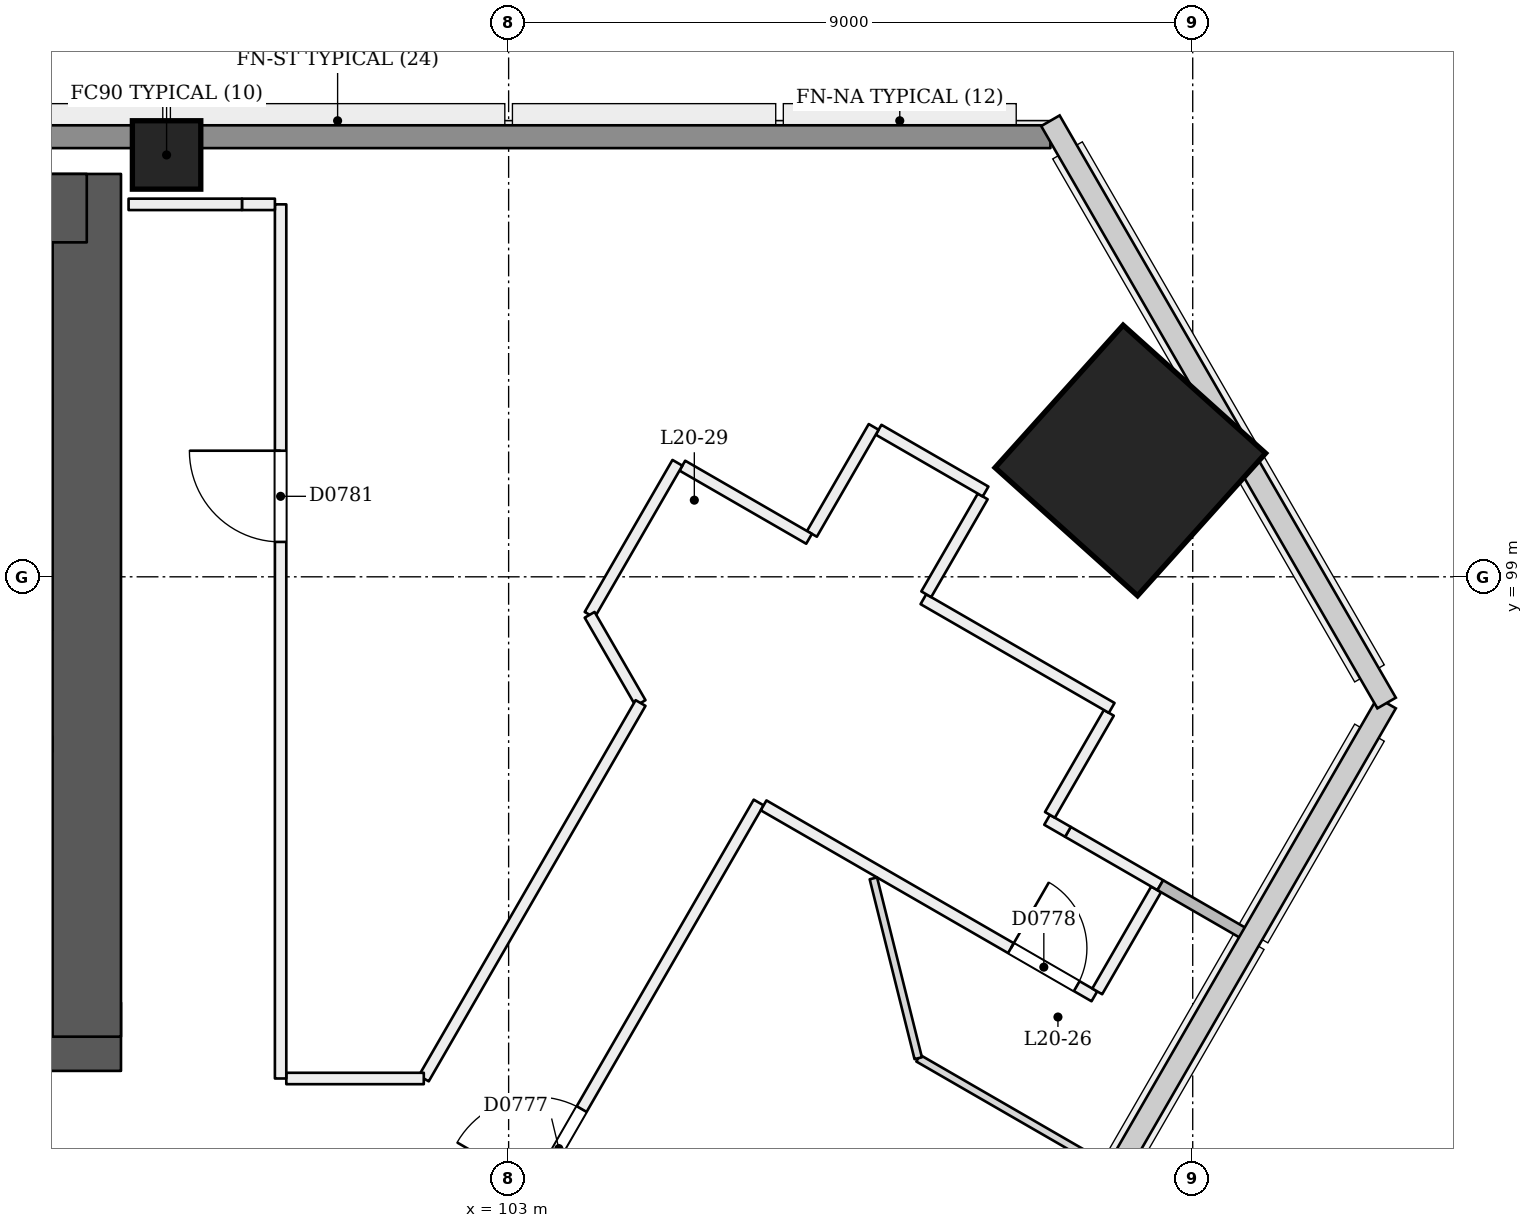
"""IFC4 building model, lengths in metres.
Left out: names, types, materials, properties, quantities, classifications, styles, units other than length and angle.
Written with IfcOpenShell. Run it as: python <this file> out.ifc"""

import sys

from ifc_helpers import new_model, si_unit, direction, frame, frame_2d, origin, origin_2d, place, context, subcontext, project, spatial, rectangle, extrude, element, fill, save


model = new_model("IFC4")
c1 = context("Model", 3, precision=1e-05, world=origin(), true_north=direction((0.0, 1.0)))
c2 = subcontext(c1, "Body", "Model", "MODEL_VIEW")
j1 = project(units=[si_unit("LENGTHUNIT", "METRE"), si_unit("PLANEANGLEUNIT", "RADIAN")], contexts=[c1])
p1 = place(None, origin())
s1 = spatial("IfcSite", under=j1, at=p1, CompositionType="ELEMENT")
p2 = place(p1, origin())
s2 = spatial("IfcBuilding", under=s1, at=p2, CompositionType="ELEMENT")
p3 = place(p2, frame((0.0, 0.0, 81.0)))
s3 = spatial("IfcBuildingStorey", under=s2, at=p3, CompositionType="ELEMENT", Elevation=81.0)
p4 = place(p3, frame((72.55, 92.95, 0.0), z_axis=(0.0, 0.0, 1.0), x_axis=(1.0, 0.0, 0.0)))
e1 = element("IfcWall", 1, at=p4, inside=s3, PredefinedType="SHEAR", context=c2, shape_type="SweptSolid", body=[
    extrude(rectangle(XDim=25.35, YDim=0.9, at=frame_2d((12.675, 0.0))), origin(), (0.0, 0.0, 1.0), 3.6),
])
p5 = place(p4, frame((1.25, 0.0, 0.0)))
e2 = element("IfcOpeningElement", 2, at=p5, cuts=e1, PredefinedType="OPENING", context=c2, shape_type="SweptSolid", body=[
    extrude(rectangle(XDim=1.2, YDim=2.1, at=frame_2d((0.6, 1.05))), frame((0.0, 0.46, 0.0), z_axis=(0.0, -1.0, 0.0), x_axis=(1.0, 0.0, 0.0)), (0.0, 0.0, 1.0), 0.921),
])
p6 = place(p4, frame((3.45, 0.0, 0.0)))
e3 = element("IfcOpeningElement", 3, at=p6, cuts=e1, PredefinedType="OPENING", context=c2, shape_type="SweptSolid", body=[
    extrude(rectangle(XDim=1.2, YDim=2.1, at=frame_2d((0.6, 1.05))), frame((0.0, 0.46, 0.0), z_axis=(0.0, -1.0, 0.0), x_axis=(1.0, 0.0, 0.0)), (0.0, 0.0, 1.0), 0.921),
])
p7 = place(p4, frame((13.45, 0.0, 0.0)))
e4 = element("IfcOpeningElement", 4, at=p7, cuts=e1, PredefinedType="OPENING", context=c2, shape_type="SweptSolid", body=[
    extrude(rectangle(XDim=1.2, YDim=2.1, at=frame_2d((0.6, 1.05))), frame((0.0, 0.46, 0.0), z_axis=(0.0, -1.0, 0.0), x_axis=(1.0, 0.0, 0.0)), (0.0, 0.0, 1.0), 0.921),
])
p8 = place(p4, frame((15.913, 0.0, 0.0)))
e5 = element("IfcOpeningElement", 5, at=p8, cuts=e1, PredefinedType="OPENING", context=c2, shape_type="SweptSolid", body=[
    extrude(rectangle(XDim=1.0, YDim=2.1, at=frame_2d((0.5, 1.05))), frame((0.0, 0.46, 0.0), z_axis=(0.0, -1.0, 0.0), x_axis=(1.0, 0.0, 0.0)), (0.0, 0.0, 1.0), 0.921),
])
p9 = place(p4, frame((18.35, 0.0, 0.0)))
e6 = element("IfcOpeningElement", 6, at=p9, cuts=e1, PredefinedType="OPENING", context=c2, shape_type="SweptSolid", body=[
    extrude(rectangle(XDim=1.0, YDim=2.1, at=frame_2d((0.5, 1.05))), frame((0.0, 0.46, 0.0), z_axis=(0.0, -1.0, 0.0), x_axis=(1.0, 0.0, 0.0)), (0.0, 0.0, 1.0), 0.921),
])
p10 = place(p4, frame((20.7, 0.0, 0.0)))
e7 = element("IfcOpeningElement", 7, at=p10, cuts=e1, PredefinedType="OPENING", context=c2, shape_type="SweptSolid", body=[
    extrude(rectangle(XDim=1.0, YDim=2.1, at=frame_2d((0.5, 1.05))), frame((0.0, 0.46, 0.0), z_axis=(0.0, -1.0, 0.0), x_axis=(1.0, 0.0, 0.0)), (0.0, 0.0, 1.0), 0.921),
])
p11 = place(p4, frame((22.988, 0.0, 0.0)))
e8 = element("IfcOpeningElement", 8, at=p11, cuts=e1, PredefinedType="OPENING", context=c2, shape_type="SweptSolid", body=[
    extrude(rectangle(XDim=1.0, YDim=2.1, at=frame_2d((0.5, 1.05))), frame((0.0, 0.46, 0.0), z_axis=(0.0, -1.0, 0.0), x_axis=(1.0, 0.0, 0.0)), (0.0, 0.0, 1.0), 0.921),
])
p12 = place(p3, frame((97.45, 92.95, 0.0), z_axis=(0.0, 0.0, 1.0), x_axis=(0.0, 1.0, 0.0)))
e9 = element("IfcWall", 9, at=p12, inside=s3, PredefinedType="SHEAR", context=c2, shape_type="SweptSolid", body=[
    extrude(rectangle(XDim=11.35, YDim=0.9, at=frame_2d((5.675, 0.0))), origin(), (0.0, 0.0, 1.0), 3.6),
])
p13 = place(p3, frame((97.45, 103.85, 0.0), z_axis=(0.0, 0.0, 1.0), x_axis=(-1.0, 0.0, 0.0)))
e10 = element("IfcWall", 10, at=p13, inside=s3, PredefinedType="SHEAR", context=c2, shape_type="SweptSolid", body=[
    extrude(rectangle(XDim=25.35, YDim=0.9, at=frame_2d((12.675, 0.0))), origin(), (0.0, 0.0, 1.0), 3.6),
])
p14 = place(p3, frame((111.213, 100.52, 0.0), z_axis=(-0.028334066552, 0.009286524205, 0.999555371723), x_axis=(0.498275404519, -0.866735139792, 0.022176985843)))
e11 = element("IfcColumn", 11, at=p14, inside=s3, PredefinedType="COLUMN", context=c2, shape_type="SweptSolid", body=[
    extrude(rectangle(XDim=2.52, YDim=2.52, at=origin_2d()), origin(), (0.0, 0.0, 1.0), 3.602),
])
p15 = place(p3, frame((98.5, 104.55, 0.0), z_axis=(0.0, 0.0, 1.0), x_axis=(1.0, 0.0, 0.0)))
e12 = element("IfcColumn", 12, at=p15, inside=s3, PredefinedType="COLUMN", context=c2, shape_type="SweptSolid", body=[
    extrude(rectangle(XDim=0.9, YDim=0.9, at=origin_2d()), origin(), (0.0, 0.0, 1.0), 3.6),
])
p16 = place(p3, frame((85.67, 60.317, 0.0), z_axis=(0.0, 0.0, 1.0), x_axis=(0.499998839017, 0.866026074077, 0.0)))
e13 = element("IfcWall", 13, at=p16, inside=s3, PredefinedType="PARTITIONING", context=c2, shape_type="SweptSolid", body=[
    extrude(rectangle(XDim=41.239, YDim=0.15, at=frame_2d((20.62, 0.0))), origin(), (0.0, 0.0, 1.0), 2.7),
])
p17 = place(p16, frame((3.246, 0.0, 0.0)))
e14 = element("IfcOpeningElement", 14, at=p17, cuts=e13, PredefinedType="OPENING", context=c2, shape_type="SweptSolid", body=[
    extrude(rectangle(XDim=1.2, YDim=2.1, at=frame_2d((0.6, 1.05))), frame((0.0, 0.085, 0.0), z_axis=(0.0, -1.0, 0.0), x_axis=(1.0, 0.0, 0.0)), (0.0, 0.0, 1.0), 0.171),
])
p18 = place(p16, frame((10.771, 0.0, 0.0)))
e15 = element("IfcOpeningElement", 15, at=p18, cuts=e13, PredefinedType="OPENING", context=c2, shape_type="SweptSolid", body=[
    extrude(rectangle(XDim=1.0, YDim=2.1, at=frame_2d((0.5, 1.05))), frame((0.0, 0.085, 0.0), z_axis=(0.0, -1.0, 0.0), x_axis=(1.0, 0.0, 0.0)), (0.0, 0.0, 1.0), 0.171),
])
p19 = place(p16, frame((14.125, 0.0, 0.0)))
e16 = element("IfcOpeningElement", 16, at=p19, cuts=e13, PredefinedType="OPENING", context=c2, shape_type="SweptSolid", body=[
    extrude(rectangle(XDim=1.0, YDim=2.1, at=frame_2d((0.5, 1.05))), frame((0.0, 0.085, 0.0), z_axis=(0.0, -1.0, 0.0), x_axis=(1.0, 0.0, 0.0)), (0.0, 0.0, 1.0), 0.171),
])
p20 = place(p16, frame((19.771, 0.0, 0.0)))
e17 = element("IfcOpeningElement", 17, at=p20, cuts=e13, PredefinedType="OPENING", context=c2, shape_type="SweptSolid", body=[
    extrude(rectangle(XDim=1.0, YDim=2.1, at=frame_2d((0.5, 1.05))), frame((0.0, 0.085, 0.0), z_axis=(0.0, -1.0, 0.0), x_axis=(1.0, 0.0, 0.0)), (0.0, 0.0, 1.0), 0.171),
])
p21 = place(p16, frame((21.98, 0.0, 0.0)))
e18 = element("IfcOpeningElement", 18, at=p21, cuts=e13, PredefinedType="OPENING", context=c2, shape_type="SweptSolid", body=[
    extrude(rectangle(XDim=1.0, YDim=2.1, at=frame_2d((0.5, 1.05))), frame((0.0, 0.085, 0.0), z_axis=(0.0, -1.0, 0.0), x_axis=(1.0, 0.0, 0.0)), (0.0, 0.0, 1.0), 0.171),
])
p22 = place(p16, frame((28.655, 0.0, 0.0)))
e19 = element("IfcOpeningElement", 19, at=p22, cuts=e13, PredefinedType="OPENING", context=c2, shape_type="SweptSolid", body=[
    extrude(rectangle(XDim=1.0, YDim=2.1, at=frame_2d((0.5, 1.05))), frame((0.0, 0.085, 0.0), z_axis=(0.0, -1.0, 0.0), x_axis=(1.0, 0.0, 0.0)), (0.0, 0.0, 1.0), 0.171),
])
p23 = place(p16, frame((35.382, 0.0, 0.0)))
e20 = element("IfcOpeningElement", 20, at=p23, cuts=e13, PredefinedType="OPENING", context=c2, shape_type="SweptSolid", body=[
    extrude(rectangle(XDim=1.2, YDim=2.1, at=frame_2d((0.6, 1.05))), frame((0.0, 0.085, 0.0), z_axis=(0.0, -1.0, 0.0), x_axis=(1.0, 0.0, 0.0)), (0.0, 0.0, 1.0), 0.171),
])
p24 = place(p3, frame((106.354, 95.993, 0.0), z_axis=(0.0, 0.0, 1.0), x_axis=(0.86603105345, -0.499990214365, 0.0)))
e21 = element("IfcWall", 21, at=p24, inside=s3, PredefinedType="PARTITIONING", context=c2, shape_type="SweptSolid", body=[
    extrude(rectangle(XDim=5.025, YDim=0.15, at=frame_2d((2.512, 0.0))), origin(), (0.0, 0.0, 1.0), 2.6),
])
p25 = place(p24, frame((3.757, 0.0, 0.0)))
e22 = element("IfcOpeningElement", 22, at=p25, cuts=e21, PredefinedType="OPENING", context=c2, shape_type="SweptSolid", body=[
    extrude(rectangle(XDim=1.0, YDim=2.1, at=frame_2d((0.5, 1.05))), frame((0.0, 0.085, 0.0), z_axis=(0.0, -1.0, 0.0), x_axis=(1.0, 0.0, 0.0)), (0.0, 0.0, 1.0), 0.171),
])
p26 = place(p3, frame((110.744, 93.546, 0.0), z_axis=(0.0, 0.0, 1.0), x_axis=(0.500086022567, 0.865975732936, 0.0)))
e23 = element("IfcWall", 23, at=p26, inside=s3, PredefinedType="PARTITIONING", context=c2, shape_type="SweptSolid", body=[
    extrude(rectangle(XDim=1.55, YDim=0.15, at=frame_2d((0.775, 0.0))), origin(), (0.0, 0.0, 1.0), 3.1),
])
p27 = place(p3, frame((111.573, 94.943, 0.0), z_axis=(0.0, 0.0, 1.0), x_axis=(-0.865985641702, 0.500068863623, 0.0)))
e24 = element("IfcWall", 24, at=p27, inside=s3, PredefinedType="PARTITIONING", context=c2, shape_type="SweptSolid", body=[
    extrude(rectangle(XDim=1.403, YDim=0.15, at=frame_2d((0.702, 0.0))), origin(), (0.0, 0.0, 1.0), 3.1),
])
p28 = place(p3, frame((110.358, 95.645, 0.0), z_axis=(0.0, 0.0, 1.0), x_axis=(-0.8660059538, 0.500033686847, 0.0)))
e25 = element("IfcWall", 25, at=p28, inside=s3, PredefinedType="PARTITIONING", context=c2, shape_type="SweptSolid", body=[
    extrude(rectangle(XDim=0.317, YDim=0.15, at=frame_2d((0.158, 0.0))), origin(), (0.0, 0.0, 1.0), 2.6),
])
p29 = place(p3, frame((110.122, 95.868, 0.0), z_axis=(0.0, 0.0, 1.0), x_axis=(0.499967891604, 0.866043940782, 0.0)))
e26 = element("IfcWall", 26, at=p29, inside=s3, PredefinedType="PARTITIONING", context=c2, shape_type="SweptSolid", body=[
    extrude(rectangle(XDim=1.55, YDim=0.15, at=frame_2d((0.775, 0.0))), origin(), (0.0, 0.0, 1.0), 2.6),
])
p30 = place(p3, frame((110.934, 97.275, 0.0), z_axis=(0.0, 0.0, 1.0), x_axis=(-0.866039195244, 0.499976111731, 0.0)))
e27 = element("IfcWall", 27, at=p30, inside=s3, PredefinedType="PARTITIONING", context=c2, shape_type="SweptSolid", body=[
    extrude(rectangle(XDim=2.861, YDim=0.15, at=frame_2d((1.43, 0.0))), origin(), (0.0, 0.0, 1.0), 2.6),
])
p31 = place(p3, frame((108.494, 98.771, 0.0), z_axis=(0.0, 0.0, 1.0), x_axis=(0.499973719246, 0.866040576453, 0.0)))
e28 = element("IfcWall", 28, at=p31, inside=s3, PredefinedType="PARTITIONING", context=c2, shape_type="SweptSolid", body=[
    extrude(rectangle(XDim=1.486, YDim=0.15, at=frame_2d((0.743, 0.0))), origin(), (0.0, 0.0, 1.0), 3.1),
])
for number, where, z_axis, x_axis in (
    (29, (109.275, 100.122, 0.0), (0.0, 0.0, 1.0), (-0.866, 0.5, 0.0)),
    (30, (107.802, 100.972, 0.0), (0.0, 0.0, 1.0), (-0.5, -0.866, 0.0)),
):
    element("IfcWall", number, at=place(p3, frame(where, z_axis=z_axis, x_axis=x_axis)), inside=s3, PredefinedType="PARTITIONING", context=c2, shape_type="SweptSolid", body=[
        extrude(rectangle(XDim=1.625, YDim=0.15, at=frame_2d((0.812, 0.0))), origin(), (0.0, 0.0, 1.0), 3.1),
    ])
p32 = place(p3, frame((106.952, 99.5, 0.0), z_axis=(0.0, 0.0, 1.0), x_axis=(-0.866033512162, 0.499985955615, 0.0)))
e31 = element("IfcWall", 31, at=p32, inside=s3, PredefinedType="PARTITIONING", context=c2, shape_type="SweptSolid", body=[
    extrude(rectangle(XDim=1.925, YDim=0.15, at=frame_2d((0.962, 0.0))), origin(), (0.0, 0.0, 1.0), 3.1),
])
p33 = place(p3, frame((105.22, 100.5, 0.0), z_axis=(0.0, 0.0, 1.0), x_axis=(-0.500027479704, -0.866009537788, 0.0)))
e32 = element("IfcWall", 32, at=p33, inside=s3, PredefinedType="PARTITIONING", context=c2, shape_type="SweptSolid", body=[
    extrude(rectangle(XDim=2.309, YDim=0.15, at=frame_2d((1.155, 0.0))), origin(), (0.0, 0.0, 1.0), 3.1),
])
p34 = place(p3, frame((104.066, 98.5, 0.0), z_axis=(0.0, 0.0, 1.0), x_axis=(0.499980071345, -0.866036909293, 0.0)))
e33 = element("IfcWall", 33, at=p34, inside=s3, PredefinedType="PARTITIONING", context=c2, shape_type="SweptSolid", body=[
    extrude(rectangle(XDim=1.34, YDim=0.15, at=frame_2d((0.67, 0.0))), origin(), (0.0, 0.0, 1.0), 3.1),
])
p35 = place(p3, frame((104.736, 97.34, 0.0), z_axis=(0.0, 0.0, 1.0), x_axis=(-0.499983049987, -0.866035189658, 0.0)))
e34 = element("IfcWall", 34, at=p35, inside=s3, PredefinedType="PARTITIONING", context=c2, shape_type="SweptSolid", body=[
    extrude(rectangle(XDim=5.704, YDim=0.15, at=frame_2d((2.852, 0.0))), origin(), (0.0, 0.0, 1.0), 3.1),
])
p36 = place(p3, frame((101.884, 92.4, 0.0), z_axis=(0.0, 0.0, 1.0), x_axis=(-1.0, 0.0, 0.0)))
e35 = element("IfcWall", 35, at=p36, inside=s3, PredefinedType="PARTITIONING", context=c2, shape_type="SweptSolid", body=[
    extrude(rectangle(XDim=1.809, YDim=0.15, at=frame_2d((0.904, 0.0))), origin(), (0.0, 0.0, 1.0), 3.1),
])
p37 = place(p3, frame((100.0, 92.4, 0.0), z_axis=(0.0, 0.0, 1.0), x_axis=(0.0, 1.0, 0.0)))
e36 = element("IfcWall", 36, at=p37, inside=s3, PredefinedType="PARTITIONING", context=c2, shape_type="SweptSolid", body=[
    extrude(rectangle(XDim=11.5, YDim=0.15, at=frame_2d((5.75, 0.0))), origin(), (0.0, 0.0, 1.0), 2.6),
])
p38 = place(p37, frame((7.059, 0.0, 0.0)))
e37 = element("IfcOpeningElement", 37, at=p38, cuts=e36, PredefinedType="OPENING", context=c2, shape_type="SweptSolid", body=[
    extrude(rectangle(XDim=1.2, YDim=2.1, at=frame_2d((0.6, 1.05))), frame((0.0, 0.085, 0.0), z_axis=(0.0, -1.0, 0.0), x_axis=(1.0, 0.0, 0.0)), (0.0, 0.0, 1.0), 0.171),
])
p39 = place(p3, frame((99.925, 103.9, 0.0), z_axis=(0.0, 0.0, 1.0), x_axis=(-1.0, 0.0, 0.0)))
e38 = element("IfcWall", 38, at=p39, inside=s3, PredefinedType="PARTITIONING", context=c2, shape_type="SweptSolid", body=[
    extrude(rectangle(XDim=0.433, YDim=0.15, at=frame_2d((0.217, 0.0))), origin(), (0.0, 0.0, 1.0), 2.6),
])
p40 = place(p3, frame((99.492, 103.9, 0.0), z_axis=(0.0, 0.0, 1.0), x_axis=(-1.0, 0.0, 0.0)))
e39 = element("IfcWall", 39, at=p40, inside=s3, PredefinedType="PARTITIONING", context=c2, shape_type="SweptSolid", body=[
    extrude(rectangle(XDim=1.492, YDim=0.15, at=frame_2d((0.746, 0.0))), origin(), (0.0, 0.0, 1.0), 3.1),
])
p41 = place(p3, frame((110.917, 91.207, 0.0), z_axis=(0.0, 0.0, 1.0), x_axis=(-0.865996226145, 0.500050533749, 0.0)))
e40 = element("IfcWall", 40, at=p41, inside=s3, PredefinedType="PARTITIONING", context=c2, shape_type="SweptSolid", body=[
    extrude(rectangle(XDim=2.92, YDim=0.1, at=frame_2d((1.46, 0.0))), origin(), (0.0, 0.0, 1.0), 2.6),
])
p42 = place(p3, frame((108.389, 92.667, 0.0), z_axis=(0.0, 0.0, 1.0), x_axis=(-0.241970246572, 0.970283669745, 0.0)))
e41 = element("IfcWall", 41, at=p42, inside=s3, PredefinedType="PARTITIONING", context=c2, shape_type="SweptSolid", body=[
    extrude(rectangle(XDim=2.439, YDim=0.1, at=frame_2d((1.219, 0.0))), origin(), (0.0, 0.0, 1.0), 3.1),
])
p43 = place(p3, frame((112.699, 94.293, 0.0), z_axis=(0.0, 0.0, 1.0), x_axis=(-0.866004217611, 0.500036693733, 0.0)))
e42 = element("IfcWall", 42, at=p43, inside=s3, PredefinedType="PARTITIONING", context=c2, shape_type="SweptSolid", body=[
    extrude(rectangle(XDim=1.3, YDim=0.15, at=frame_2d((0.65, 0.0))), origin(), (0.0, 0.0, 1.0), 3.1),
])
p44 = place(p3, frame((59.872, 104.79, 0.0), z_axis=(0.0, 0.0, 1.0), x_axis=(1.0, 0.0, 0.0)))
e43 = element("IfcWall", 43, at=p44, inside=s3, PredefinedType="SOLIDWALL", context=c2, shape_type="SweptSolid", body=[
    extrude(rectangle(XDim=50.256, YDim=0.3, at=frame_2d((25.128, 0.0))), origin(), (0.0, 0.0, 1.0), 2.6),
])
p45 = place(p23, origin())
e44 = element("IfcDoor", 44, at=p45, inside=s3, OperationType="SINGLE_SWING_LEFT", PredefinedType="NOTDEFINED", context=c2, shape_type="SweptSolid", body=[
    extrude(rectangle(XDim=1.2, YDim=2.1, at=frame_2d((0.6, 1.05))), frame((0.0, 0.025, 0.0), z_axis=(0.0, -1.0, 0.0), x_axis=(1.0, 0.0, 0.0)), (0.0, 0.0, 1.0), 0.05),
])
fill(e20, e44)
p46 = place(p25, origin())
e45 = element("IfcDoor", 45, at=p46, inside=s3, OperationType="SINGLE_SWING_LEFT", PredefinedType="NOTDEFINED", context=c2, shape_type="SweptSolid", body=[
    extrude(rectangle(XDim=1.0, YDim=2.1, at=frame_2d((0.5, 1.05))), frame((0.0, 0.025, 0.0), z_axis=(0.0, -1.0, 0.0), x_axis=(1.0, 0.0, 0.0)), (0.0, 0.0, 1.0), 0.05),
])
fill(e22, e45)
p47 = place(p38, origin())
e46 = element("IfcDoor", 46, at=p47, inside=s3, OperationType="SINGLE_SWING_RIGHT", PredefinedType="NOTDEFINED", context=c2, shape_type="SweptSolid", body=[
    extrude(rectangle(XDim=1.2, YDim=2.1, at=frame_2d((0.6, 1.05))), frame((0.0, 0.025, 0.0), z_axis=(0.0, -1.0, 0.0), x_axis=(1.0, 0.0, 0.0)), (0.0, 0.0, 1.0), 0.05),
])
fill(e37, e46)
save(model, sys.argv[1])
